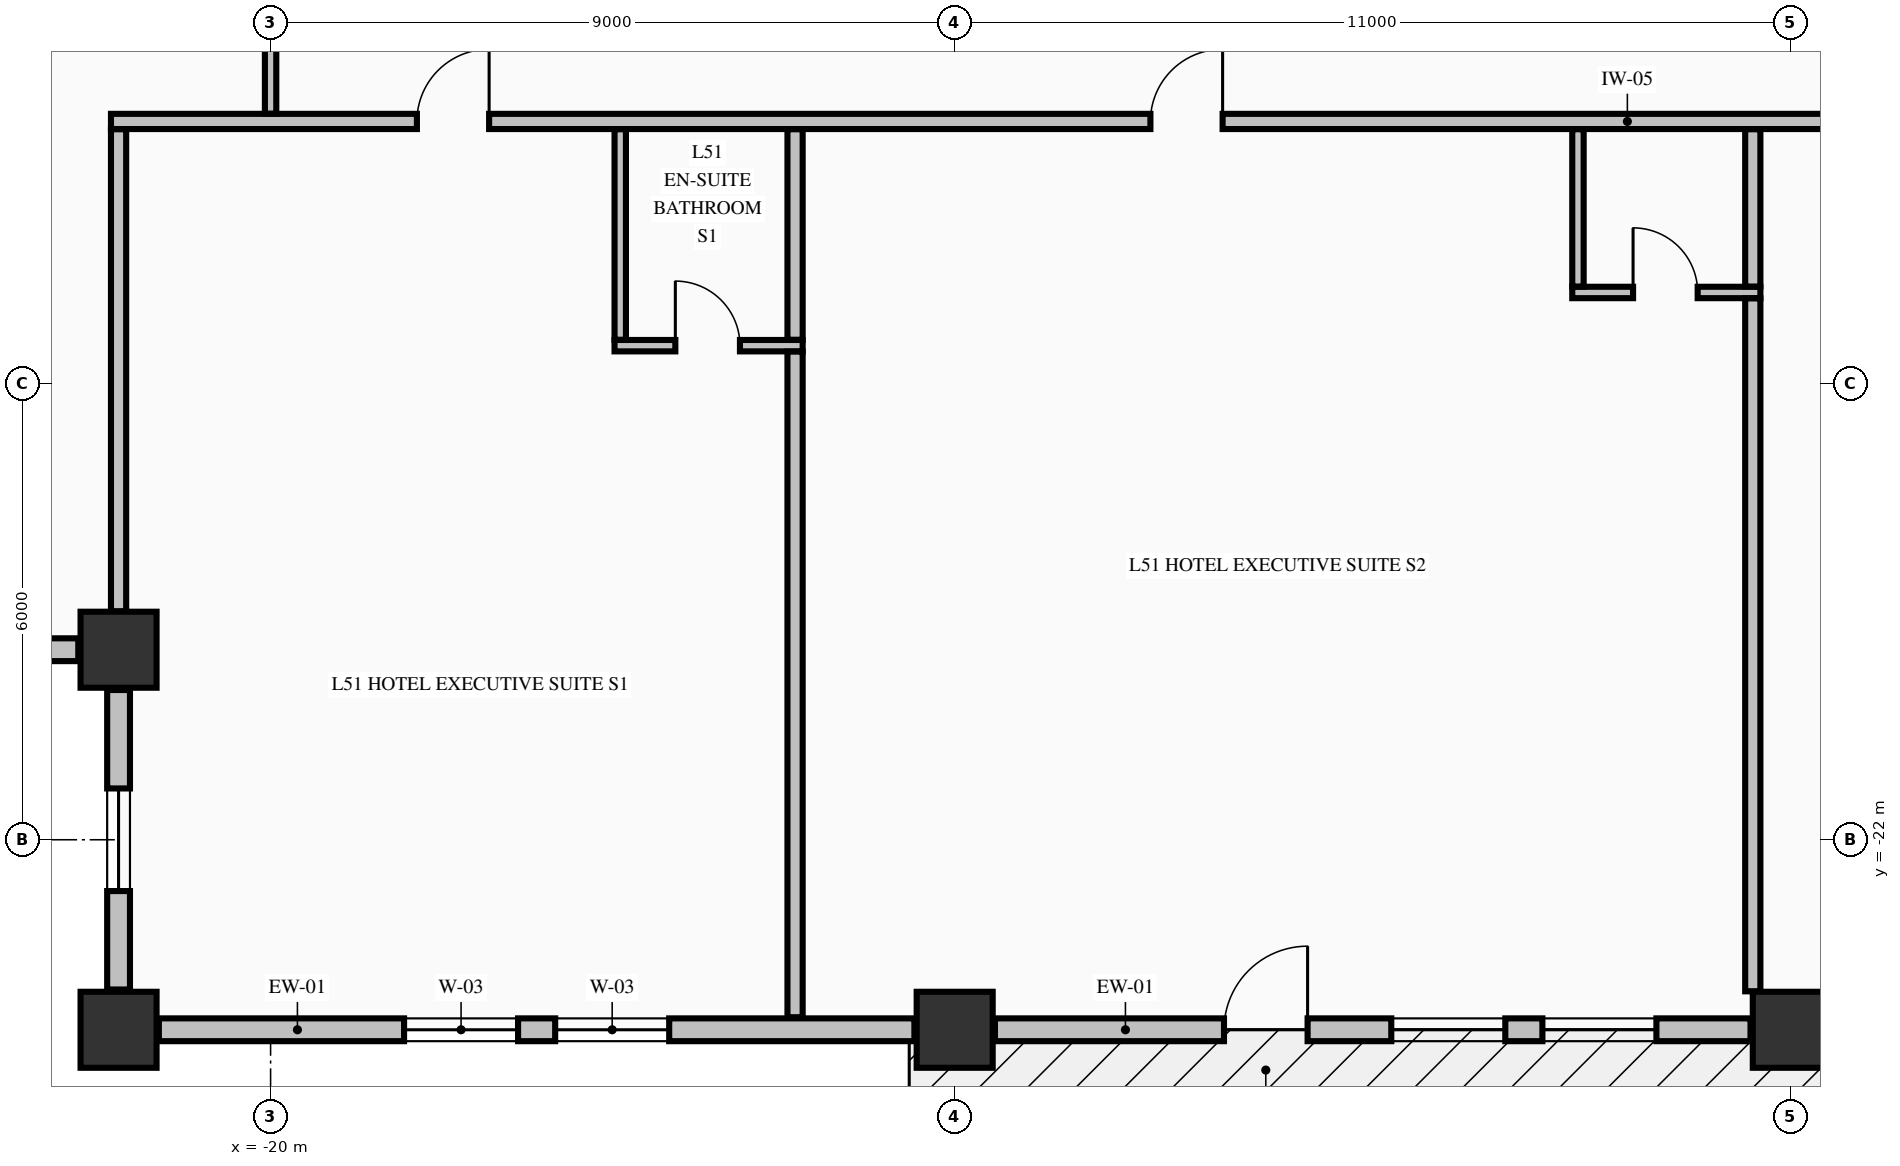
"""IFC4 building model, lengths in metres.
Left out: names, types, materials, properties, quantities, classifications, styles, units other than length and angle.
Written with IfcOpenShell. Run it as: python <this file> out.ifc"""

import sys

from ifc_helpers import new_model, si_unit, direction, frame, frame_2d, origin, origin_2d, place, context, subcontext, project, spatial, rectangle, extrude, element, fill, save


model = new_model("IFC4")
c1 = context("Model", 3, precision=1e-05, world=origin(), true_north=direction((0.0, 1.0)))
c2 = subcontext(c1, "Body", "Model", "MODEL_VIEW")
j1 = project(units=[si_unit("LENGTHUNIT", "METRE"), si_unit("PLANEANGLEUNIT", "RADIAN")], contexts=[c1])
p1 = place(None, origin())
s1 = spatial("IfcSite", under=j1, at=p1, CompositionType="ELEMENT")
p2 = place(p1, origin())
s2 = spatial("IfcBuilding", under=s1, at=p2, CompositionType="ELEMENT")
p3 = place(p2, frame((0.0, 0.0, 198.26)))
s3 = spatial("IfcBuildingStorey", under=s2, at=p3, CompositionType="ELEMENT", Elevation=198.26)
for number, where, z_axis, x_axis in (
    (1, (-22.0, -24.5, -0.25), (0.0, 0.0, 1.0), (1.0, 0.0, 0.0)),
    (2, (-11.0, -24.5, -0.25), (0.0, 0.0, 1.0), (1.0, 0.0, 0.0)),
    (3, (0.0, -24.5, -0.25), (0.0, 0.0, 1.0), (1.0, 0.0, 0.0)),
    (4, (-22.0, -19.5, -0.25), (0.0, 0.0, 1.0), (1.0, 0.0, 0.0)),
):
    element("IfcColumn", number, at=place(p3, frame(where, z_axis=z_axis, x_axis=x_axis)), inside=s3, PredefinedType="COLUMN", context=c2, shape_type="SweptSolid", body=[
        extrude(rectangle(XDim=1.0, YDim=1.0, at=origin_2d()), origin(), (0.0, 0.0, 1.0), 3.4),
    ])
p4 = place(p3, frame((-26.47, -19.5, 0.0), z_axis=(0.0, 0.0, 1.0), x_axis=(1.0, 0.0, 0.0)))
e5 = element("IfcWall", 5, at=p4, inside=s3, PredefinedType="STANDARD", context=c2, shape_type="SweptSolid", body=[
    extrude(rectangle(XDim=3.94, YDim=0.3, at=frame_2d((1.97, 0.0))), origin(), (0.0, 0.0, 1.0), 2.542),
])
p5 = place(p4, frame((1.295, 0.0, 0.68)))
e6 = element("IfcOpeningElement", 6, at=p5, cuts=e5, PredefinedType="OPENING", context=c2, shape_type="SweptSolid", body=[
    extrude(rectangle(XDim=1.35, YDim=1.42, at=frame_2d((0.675, 0.71))), frame((0.0, 0.16, 0.0), z_axis=(0.0, -1.0, 0.0), x_axis=(1.0, 0.0, 0.0)), (0.0, 0.0, 1.0), 0.32),
])
p6 = place(p3, frame((-22.0, -20.03, 0.0), z_axis=(0.0, 0.0, 1.0), x_axis=(0.0, -1.0, 0.0)))
e7 = element("IfcWall", 7, at=p6, inside=s3, PredefinedType="STANDARD", context=c2, shape_type="SweptSolid", body=[
    extrude(rectangle(XDim=3.94, YDim=0.3, at=frame_2d((1.97, 0.0))), origin(), (0.0, 0.0, 1.0), 2.542),
])
p7 = place(p6, frame((1.295, 0.0, 0.68)))
e8 = element("IfcOpeningElement", 8, at=p7, cuts=e7, PredefinedType="OPENING", context=c2, shape_type="SweptSolid", body=[
    extrude(rectangle(XDim=1.35, YDim=1.42, at=frame_2d((0.675, 0.71))), frame((0.0, 0.16, 0.0), z_axis=(0.0, -1.0, 0.0), x_axis=(1.0, 0.0, 0.0)), (0.0, 0.0, 1.0), 0.32),
])
p8 = place(p3, frame((-21.47, -24.5, 0.0), z_axis=(0.0, 0.0, 1.0), x_axis=(1.0, 0.0, 0.0)))
e9 = element("IfcWall", 9, at=p8, inside=s3, PredefinedType="STANDARD", context=c2, shape_type="SweptSolid", body=[
    extrude(rectangle(XDim=9.94, YDim=0.3, at=frame_2d((4.97, 0.0))), origin(), (0.0, 0.0, 1.0), 2.542),
])
p9 = place(p8, frame((3.226, 0.0, 0.72)))
e10 = element("IfcOpeningElement", 10, at=p9, cuts=e9, PredefinedType="OPENING", context=c2, shape_type="SweptSolid", body=[
    extrude(rectangle(XDim=1.5, YDim=1.6, at=frame_2d((0.75, 0.8))), frame((0.0, 0.16, 0.0), z_axis=(0.0, -1.0, 0.0), x_axis=(1.0, 0.0, 0.0)), (0.0, 0.0, 1.0), 0.32),
])
p10 = place(p8, frame((5.214, 0.0, 0.72)))
e11 = element("IfcOpeningElement", 11, at=p10, cuts=e9, PredefinedType="OPENING", context=c2, shape_type="SweptSolid", body=[
    extrude(rectangle(XDim=1.5, YDim=1.6, at=frame_2d((0.75, 0.8))), frame((0.0, 0.16, 0.0), z_axis=(0.0, -1.0, 0.0), x_axis=(1.0, 0.0, 0.0)), (0.0, 0.0, 1.0), 0.32),
])
p11 = place(p3, frame((-10.47, -24.5, 0.0), z_axis=(0.0, 0.0, 1.0), x_axis=(1.0, 0.0, 0.0)))
e12 = element("IfcWall", 12, at=p11, inside=s3, PredefinedType="STANDARD", context=c2, shape_type="SweptSolid", body=[
    extrude(rectangle(XDim=9.94, YDim=0.3, at=frame_2d((4.97, 0.0))), origin(), (0.0, 0.0, 1.0), 2.542),
])
p12 = place(p11, frame((3.013, 0.0, 0.0)))
e13 = element("IfcOpeningElement", 13, at=p12, cuts=e12, PredefinedType="OPENING", context=c2, shape_type="SweptSolid", body=[
    extrude(rectangle(XDim=1.1, YDim=2.15, at=frame_2d((0.55, 1.075))), frame((0.0, 0.16, 0.0), z_axis=(0.0, -1.0, 0.0), x_axis=(1.0, 0.0, 0.0)), (0.0, 0.0, 1.0), 0.32),
])
p13 = place(p11, frame((5.214, 0.0, 0.72)))
e14 = element("IfcOpeningElement", 14, at=p13, cuts=e12, PredefinedType="OPENING", context=c2, shape_type="SweptSolid", body=[
    extrude(rectangle(XDim=1.5, YDim=1.6, at=frame_2d((0.75, 0.8))), frame((0.0, 0.16, 0.0), z_axis=(0.0, -1.0, 0.0), x_axis=(1.0, 0.0, 0.0)), (0.0, 0.0, 1.0), 0.32),
])
p14 = place(p11, frame((7.202, 0.0, 0.72)))
e15 = element("IfcOpeningElement", 15, at=p14, cuts=e12, PredefinedType="OPENING", context=c2, shape_type="SweptSolid", body=[
    extrude(rectangle(XDim=1.5, YDim=1.6, at=frame_2d((0.75, 0.8))), frame((0.0, 0.16, 0.0), z_axis=(0.0, -1.0, 0.0), x_axis=(1.0, 0.0, 0.0)), (0.0, 0.0, 1.0), 0.32),
])
p15 = place(p3, frame((-15.475, -15.5, 0.0), z_axis=(0.0, 0.0, 1.0), x_axis=(1.0, 0.0, 0.0)))
e16 = element("IfcWall", 16, at=p15, inside=s3, PredefinedType="PARTITIONING", context=c2, shape_type="SweptSolid", body=[
    extrude(rectangle(XDim=2.475, YDim=0.15, at=frame_2d((1.238, 0.0))), origin(), (0.0, 0.0, 1.0), 3.15),
])
p16 = place(p15, frame((0.8, 0.0, 0.0)))
e17 = element("IfcOpeningElement", 17, at=p16, cuts=e16, PredefinedType="OPENING", context=c2, shape_type="SweptSolid", body=[
    extrude(rectangle(XDim=0.85, YDim=2.1, at=frame_2d((0.425, 1.05))), frame((0.0, 0.085, 0.0), z_axis=(0.0, -1.0, 0.0), x_axis=(1.0, 0.0, 0.0)), (0.0, 0.0, 1.0), 0.17),
])
p17 = place(p3, frame((-2.875, -14.8, 0.0), z_axis=(0.0, 0.0, 1.0), x_axis=(1.0, 0.0, 0.0)))
e18 = element("IfcWall", 18, at=p17, inside=s3, PredefinedType="PARTITIONING", context=c2, shape_type="SweptSolid", body=[
    extrude(rectangle(XDim=2.475, YDim=0.15, at=frame_2d((1.238, 0.0))), origin(), (0.0, 0.0, 1.0), 3.15),
])
p18 = place(p17, frame((0.8, 0.0, 0.0)))
e19 = element("IfcOpeningElement", 19, at=p18, cuts=e18, PredefinedType="OPENING", context=c2, shape_type="SweptSolid", body=[
    extrude(rectangle(XDim=0.85, YDim=2.1, at=frame_2d((0.425, 1.05))), frame((0.0, 0.085, 0.0), z_axis=(0.0, -1.0, 0.0), x_axis=(1.0, 0.0, 0.0)), (0.0, 0.0, 1.0), 0.17),
])
p19 = place(p3, frame((-22.1, -12.55, 0.0), z_axis=(0.0, 0.0, 1.0), x_axis=(1.0, 0.0, 0.0)))
e20 = element("IfcWall", 20, at=p19, inside=s3, PredefinedType="PARTITIONING", context=c2, shape_type="SweptSolid", body=[
    extrude(rectangle(XDim=39.2, YDim=0.2, at=frame_2d((19.6, 0.0))), origin(), (0.0, 0.0, 1.0), 3.15),
])
p20 = place(p19, frame((4.025, 0.0, 0.0)))
e21 = element("IfcOpeningElement", 21, at=p20, cuts=e20, PredefinedType="OPENING", context=c2, shape_type="SweptSolid", body=[
    extrude(rectangle(XDim=0.95, YDim=2.15, at=frame_2d((0.475, 1.075))), frame((0.0, 0.11, 0.0), z_axis=(0.0, -1.0, 0.0), x_axis=(1.0, 0.0, 0.0)), (0.0, 0.0, 1.0), 0.22),
])
p21 = place(p19, frame((13.675, 0.0, 0.0)))
e22 = element("IfcOpeningElement", 22, at=p21, cuts=e20, PredefinedType="OPENING", context=c2, shape_type="SweptSolid", body=[
    extrude(rectangle(XDim=0.95, YDim=2.15, at=frame_2d((0.475, 1.075))), frame((0.0, 0.11, 0.0), z_axis=(0.0, -1.0, 0.0), x_axis=(1.0, 0.0, 0.0)), (0.0, 0.0, 1.0), 0.22),
])
p22 = place(p19, frame((25.275, 0.0, 0.0)))
e23 = element("IfcOpeningElement", 23, at=p22, cuts=e20, PredefinedType="OPENING", context=c2, shape_type="SweptSolid", body=[
    extrude(rectangle(XDim=0.95, YDim=2.15, at=frame_2d((0.475, 1.075))), frame((0.0, 0.11, 0.0), z_axis=(0.0, -1.0, 0.0), x_axis=(1.0, 0.0, 0.0)), (0.0, 0.0, 1.0), 0.22),
])
p23 = place(p19, frame((33.375, 0.0, 0.0)))
e24 = element("IfcOpeningElement", 24, at=p23, cuts=e20, PredefinedType="OPENING", context=c2, shape_type="SweptSolid", body=[
    extrude(rectangle(XDim=0.95, YDim=2.15, at=frame_2d((0.475, 1.075))), frame((0.0, 0.11, 0.0), z_axis=(0.0, -1.0, 0.0), x_axis=(1.0, 0.0, 0.0)), (0.0, 0.0, 1.0), 0.22),
])
p24 = place(p3, frame((-22.0, -18.994, 0.0), z_axis=(0.0, 0.0, 1.0), x_axis=(0.0, 1.0, 0.0)))
e25 = element("IfcWall", 25, at=p24, inside=s3, PredefinedType="PARTITIONING", context=c2, shape_type="SweptSolid", body=[
    extrude(rectangle(XDim=6.341, YDim=0.2, at=frame_2d((3.17, 0.0))), origin(), (0.0, 0.0, 1.0), 3.15),
])
p25 = place(p3, frame((-20.0, -12.447, 0.0), z_axis=(0.0, 0.0, 1.0), x_axis=(0.0, 1.0, 0.0)))
e26 = element("IfcWall", 26, at=p25, inside=s3, PredefinedType="PARTITIONING", context=c2, shape_type="SweptSolid", body=[
    extrude(rectangle(XDim=2.066, YDim=0.15, at=frame_2d((1.033, 0.0))), origin(), (0.0, 0.0, 1.0), 2.342),
])
p26 = place(p3, frame((-15.4, -15.422, 0.0), z_axis=(0.0, 0.0, 1.0), x_axis=(0.0, 1.0, 0.0)))
e27 = element("IfcWall", 27, at=p26, inside=s3, PredefinedType="PARTITIONING", context=c2, shape_type="SweptSolid", body=[
    extrude(rectangle(XDim=2.769, YDim=0.15, at=frame_2d((1.385, 0.0))), origin(), (0.0, 0.0, 1.0), 3.15),
])
p27 = place(p3, frame((-13.1, -24.335, 0.0), z_axis=(0.0, 0.0, 1.0), x_axis=(0.0, 1.0, 0.0)))
e28 = element("IfcWall", 28, at=p27, inside=s3, PredefinedType="PARTITIONING", context=c2, shape_type="SweptSolid", body=[
    extrude(rectangle(XDim=8.757, YDim=0.2, at=frame_2d((4.378, 0.0))), origin(), (0.0, 0.0, 1.0), 3.15),
])
p28 = place(p3, frame((-13.1, -15.422, 0.0), z_axis=(0.0, 0.0, 1.0), x_axis=(0.0, 1.0, 0.0)))
e29 = element("IfcWall", 29, at=p28, inside=s3, PredefinedType="PARTITIONING", context=c2, shape_type="SweptSolid", body=[
    extrude(rectangle(XDim=2.769, YDim=0.2, at=frame_2d((1.385, 0.0))), origin(), (0.0, 0.0, 1.0), 3.15),
])
p29 = place(p3, frame((-2.8, -14.722, 0.0), z_axis=(0.0, 0.0, 1.0), x_axis=(0.0, 1.0, 0.0)))
e30 = element("IfcWall", 30, at=p29, inside=s3, PredefinedType="PARTITIONING", context=c2, shape_type="SweptSolid", body=[
    extrude(rectangle(XDim=2.069, YDim=0.15, at=frame_2d((1.034, 0.0))), origin(), (0.0, 0.0, 1.0), 3.15),
])
p30 = place(p3, frame((-0.5, -23.994, 0.0), z_axis=(0.0, 0.0, 1.0), x_axis=(0.0, 1.0, 0.0)))
e31 = element("IfcWall", 31, at=p30, inside=s3, PredefinedType="PARTITIONING", context=c2, shape_type="SweptSolid", body=[
    extrude(rectangle(XDim=9.116, YDim=0.2, at=frame_2d((4.558, 0.0))), origin(), (0.0, 0.0, 1.0), 3.15),
])
p31 = place(p3, frame((-0.5, -14.722, 0.0), z_axis=(0.0, 0.0, 1.0), x_axis=(0.0, 1.0, 0.0)))
e32 = element("IfcWall", 32, at=p31, inside=s3, PredefinedType="PARTITIONING", context=c2, shape_type="SweptSolid", body=[
    extrude(rectangle(XDim=2.069, YDim=0.2, at=frame_2d((1.034, 0.0))), origin(), (0.0, 0.0, 1.0), 3.15),
])
p32 = place(p7, origin())
e33 = element("IfcWindow", 33, at=p32, inside=s3, PartitioningType="SINGLE_PANEL", PredefinedType="WINDOW", context=c2, shape_type="SweptSolid", body=[
    extrude(rectangle(XDim=1.35, YDim=1.42, at=frame_2d((0.675, 0.71))), frame((0.0, 0.03, 0.0), z_axis=(0.0, -1.0, 0.0), x_axis=(1.0, 0.0, 0.0)), (0.0, 0.0, 1.0), 0.06),
])
fill(e8, e33)
p33 = place(p9, origin())
e34 = element("IfcWindow", 34, at=p33, inside=s3, PartitioningType="SINGLE_PANEL", PredefinedType="WINDOW", context=c2, shape_type="SweptSolid", body=[
    extrude(rectangle(XDim=1.5, YDim=1.6, at=frame_2d((0.75, 0.8))), frame((0.0, 0.03, 0.0), z_axis=(0.0, -1.0, 0.0), x_axis=(1.0, 0.0, 0.0)), (0.0, 0.0, 1.0), 0.06),
])
fill(e10, e34)
p34 = place(p10, origin())
e35 = element("IfcWindow", 35, at=p34, inside=s3, PartitioningType="SINGLE_PANEL", PredefinedType="WINDOW", context=c2, shape_type="SweptSolid", body=[
    extrude(rectangle(XDim=1.5, YDim=1.6, at=frame_2d((0.75, 0.8))), frame((0.0, 0.03, 0.0), z_axis=(0.0, -1.0, 0.0), x_axis=(1.0, 0.0, 0.0)), (0.0, 0.0, 1.0), 0.06),
])
fill(e11, e35)
p35 = place(p12, origin())
e36 = element("IfcDoor", 36, at=p35, inside=s3, OperationType="SINGLE_SWING_RIGHT", PredefinedType="DOOR", context=c2, shape_type="SweptSolid", body=[
    extrude(rectangle(XDim=1.1, YDim=2.15, at=frame_2d((0.55, 1.075))), frame((0.0, 0.025, 0.0), z_axis=(0.0, -1.0, 0.0), x_axis=(1.0, 0.0, 0.0)), (0.0, 0.0, 1.0), 0.05),
])
fill(e13, e36)
p36 = place(p13, origin())
e37 = element("IfcWindow", 37, at=p36, inside=s3, PartitioningType="SINGLE_PANEL", PredefinedType="WINDOW", context=c2, shape_type="SweptSolid", body=[
    extrude(rectangle(XDim=1.5, YDim=1.6, at=frame_2d((0.75, 0.8))), frame((0.0, 0.03, 0.0), z_axis=(0.0, -1.0, 0.0), x_axis=(1.0, 0.0, 0.0)), (0.0, 0.0, 1.0), 0.06),
])
fill(e14, e37)
p37 = place(p14, origin())
e38 = element("IfcWindow", 38, at=p37, inside=s3, PartitioningType="SINGLE_PANEL", PredefinedType="WINDOW", context=c2, shape_type="SweptSolid", body=[
    extrude(rectangle(XDim=1.5, YDim=1.6, at=frame_2d((0.75, 0.8))), frame((0.0, 0.03, 0.0), z_axis=(0.0, -1.0, 0.0), x_axis=(1.0, 0.0, 0.0)), (0.0, 0.0, 1.0), 0.06),
])
fill(e15, e38)
p38 = place(p20, origin())
e39 = element("IfcDoor", 39, at=p38, inside=s3, OperationType="SINGLE_SWING_RIGHT", PredefinedType="DOOR", context=c2, shape_type="SweptSolid", body=[
    extrude(rectangle(XDim=0.95, YDim=2.15, at=frame_2d((0.475, 1.075))), frame((0.0, 0.025, 0.0), z_axis=(0.0, -1.0, 0.0), x_axis=(1.0, 0.0, 0.0)), (0.0, 0.0, 1.0), 0.05),
])
fill(e21, e39)
p39 = place(p16, origin())
e40 = element("IfcDoor", 40, at=p39, inside=s3, OperationType="SINGLE_SWING_LEFT", PredefinedType="DOOR", context=c2, shape_type="SweptSolid", body=[
    extrude(rectangle(XDim=0.85, YDim=2.1, at=frame_2d((0.425, 1.05))), frame((0.0, 0.025, 0.0), z_axis=(0.0, -1.0, 0.0), x_axis=(1.0, 0.0, 0.0)), (0.0, 0.0, 1.0), 0.05),
])
fill(e17, e40)
p40 = place(p21, origin())
e41 = element("IfcDoor", 41, at=p40, inside=s3, OperationType="SINGLE_SWING_RIGHT", PredefinedType="DOOR", context=c2, shape_type="SweptSolid", body=[
    extrude(rectangle(XDim=0.95, YDim=2.15, at=frame_2d((0.475, 1.075))), frame((0.0, 0.025, 0.0), z_axis=(0.0, -1.0, 0.0), x_axis=(1.0, 0.0, 0.0)), (0.0, 0.0, 1.0), 0.05),
])
fill(e22, e41)
p41 = place(p18, origin())
e42 = element("IfcDoor", 42, at=p41, inside=s3, OperationType="SINGLE_SWING_LEFT", PredefinedType="DOOR", context=c2, shape_type="SweptSolid", body=[
    extrude(rectangle(XDim=0.85, YDim=2.1, at=frame_2d((0.425, 1.05))), frame((0.0, 0.025, 0.0), z_axis=(0.0, -1.0, 0.0), x_axis=(1.0, 0.0, 0.0)), (0.0, 0.0, 1.0), 0.05),
])
fill(e19, e42)
save(model, sys.argv[1])
